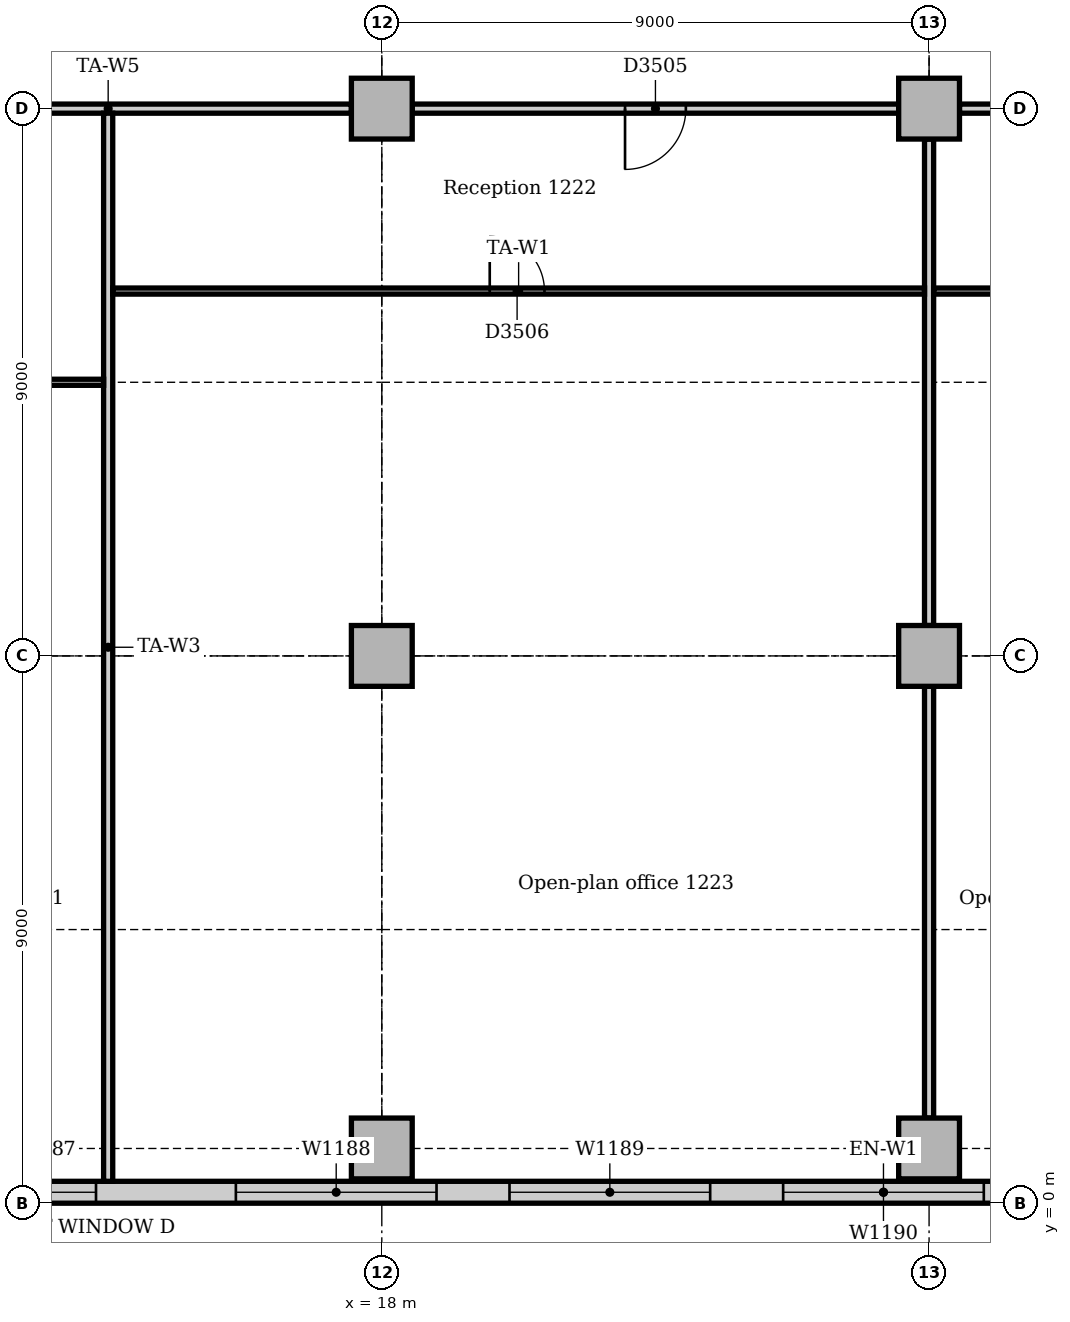
"""IFC4 building model, lengths in metres.
Left out: names, types, materials, properties, quantities, classifications, styles, units other than length and angle.
Written with IfcOpenShell. Run it as: python <this file> out.ifc"""

import sys

from ifc_helpers import new_model, si_unit, direction, frame, frame_2d, origin, origin_2d, place, context, subcontext, project, spatial, rectangle, extrude, element, fill, save


model = new_model("IFC4")
c1 = context("Model", 3, precision=1e-05, world=origin(), true_north=direction((0.0, 1.0)))
c2 = subcontext(c1, "Body", "Model", "MODEL_VIEW")
j1 = project(units=[si_unit("LENGTHUNIT", "METRE"), si_unit("PLANEANGLEUNIT", "RADIAN")], contexts=[c1])
p1 = place(None, origin())
s1 = spatial("IfcSite", under=j1, at=p1, CompositionType="ELEMENT")
p2 = place(p1, origin())
s2 = spatial("IfcBuilding", under=s1, at=p2, CompositionType="ELEMENT")
p3 = place(p2, frame((0.0, 0.0, 55.0)))
s3 = spatial("IfcBuildingStorey", under=s2, at=p3, CompositionType="ELEMENT", Elevation=55.0)
for number, where, z_axis, x_axis in (
    (1, (18.0, 0.9, 0.0), (0.0, 0.0, 1.0), (1.0, 0.0, 0.0)),
    (2, (27.0, 0.9, 0.0), (0.0, 0.0, 1.0), (1.0, 0.0, 0.0)),
    (3, (18.0, 9.0, 0.0), (0.0, 0.0, 1.0), (1.0, 0.0, 0.0)),
    (4, (18.0, 18.0, 0.0), (0.0, 0.0, 1.0), (1.0, 0.0, 0.0)),
    (5, (27.0, 9.0, 0.0), (0.0, 0.0, 1.0), (1.0, 0.0, 0.0)),
    (6, (27.0, 18.0, 0.0), (0.0, 0.0, 1.0), (1.0, 0.0, 0.0)),
):
    element("IfcColumn", number, at=place(p3, frame(where, z_axis=z_axis, x_axis=x_axis)), inside=s3, PredefinedType="COLUMN", context=c2, shape_type="SweptSolid", body=[
        extrude(rectangle(XDim=1.0, YDim=1.0, at=origin_2d()), origin(), (0.0, 0.0, 1.0), 3.85),
    ])
p4 = place(p3, frame((4.243, 0.18, 0.0), z_axis=(0.0, 0.0, 1.0), x_axis=(1.0, 0.0, 0.0)))
e7 = element("IfcWall", 7, at=p4, inside=s3, PredefinedType="STANDARD", context=c2, shape_type="SweptSolid", body=[
    extrude(rectangle(XDim=44.015, YDim=0.36, at=frame_2d((22.007, 0.0))), origin(), (0.0, 0.0, 1.0), 3.85),
])
p5 = place(p4, frame((2.707, 0.0, 0.9)))
e8 = element("IfcOpeningElement", 8, at=p5, cuts=e7, PredefinedType="OPENING", context=c2, shape_type="SweptSolid", body=[
    extrude(rectangle(XDim=3.3, YDim=1.6, at=frame_2d((1.65, 0.8))), frame((0.0, 0.19, 0.0), z_axis=(0.0, -1.0, 0.0), x_axis=(1.0, 0.0, 0.0)), (0.0, 0.0, 1.0), 0.38),
])
p6 = place(p4, frame((7.257, 0.0, 0.9)))
e9 = element("IfcOpeningElement", 9, at=p6, cuts=e7, PredefinedType="OPENING", context=c2, shape_type="SweptSolid", body=[
    extrude(rectangle(XDim=1.8, YDim=1.6, at=frame_2d((0.9, 0.8))), frame((0.0, 0.19, 0.0), z_axis=(0.0, -1.0, 0.0), x_axis=(1.0, 0.0, 0.0)), (0.0, 0.0, 1.0), 0.38),
])
p7 = place(p4, frame((11.357, 0.0, 0.9)))
e10 = element("IfcOpeningElement", 10, at=p7, cuts=e7, PredefinedType="OPENING", context=c2, shape_type="SweptSolid", body=[
    extrude(rectangle(XDim=3.3, YDim=1.6, at=frame_2d((1.65, 0.8))), frame((0.0, 0.19, 0.0), z_axis=(0.0, -1.0, 0.0), x_axis=(1.0, 0.0, 0.0)), (0.0, 0.0, 1.0), 0.38),
])
p8 = place(p4, frame((15.857, 0.0, 0.9)))
e11 = element("IfcOpeningElement", 11, at=p8, cuts=e7, PredefinedType="OPENING", context=c2, shape_type="SweptSolid", body=[
    extrude(rectangle(XDim=3.3, YDim=1.6, at=frame_2d((1.65, 0.8))), frame((0.0, 0.19, 0.0), z_axis=(0.0, -1.0, 0.0), x_axis=(1.0, 0.0, 0.0)), (0.0, 0.0, 1.0), 0.38),
])
p9 = place(p4, frame((20.357, 0.0, 0.9)))
e12 = element("IfcOpeningElement", 12, at=p9, cuts=e7, PredefinedType="OPENING", context=c2, shape_type="SweptSolid", body=[
    extrude(rectangle(XDim=3.3, YDim=1.6, at=frame_2d((1.65, 0.8))), frame((0.0, 0.19, 0.0), z_axis=(0.0, -1.0, 0.0), x_axis=(1.0, 0.0, 0.0)), (0.0, 0.0, 1.0), 0.38),
])
p10 = place(p4, frame((25.307, 0.0, 0.9)))
e13 = element("IfcOpeningElement", 13, at=p10, cuts=e7, PredefinedType="OPENING", context=c2, shape_type="SweptSolid", body=[
    extrude(rectangle(XDim=1.8, YDim=1.6, at=frame_2d((0.9, 0.8))), frame((0.0, 0.19, 0.0), z_axis=(0.0, -1.0, 0.0), x_axis=(1.0, 0.0, 0.0)), (0.0, 0.0, 1.0), 0.38),
])
p11 = place(p4, frame((29.357, 0.0, 0.9)))
e14 = element("IfcOpeningElement", 14, at=p11, cuts=e7, PredefinedType="OPENING", context=c2, shape_type="SweptSolid", body=[
    extrude(rectangle(XDim=3.3, YDim=1.6, at=frame_2d((1.65, 0.8))), frame((0.0, 0.19, 0.0), z_axis=(0.0, -1.0, 0.0), x_axis=(1.0, 0.0, 0.0)), (0.0, 0.0, 1.0), 0.38),
])
p12 = place(p4, frame((33.857, 0.0, 0.9)))
e15 = element("IfcOpeningElement", 15, at=p12, cuts=e7, PredefinedType="OPENING", context=c2, shape_type="SweptSolid", body=[
    extrude(rectangle(XDim=3.3, YDim=1.6, at=frame_2d((1.65, 0.8))), frame((0.0, 0.19, 0.0), z_axis=(0.0, -1.0, 0.0), x_axis=(1.0, 0.0, 0.0)), (0.0, 0.0, 1.0), 0.38),
])
p13 = place(p4, frame((38.657, 0.0, 0.9)))
e16 = element("IfcOpeningElement", 16, at=p13, cuts=e7, PredefinedType="OPENING", context=c2, shape_type="SweptSolid", body=[
    extrude(rectangle(XDim=3.3, YDim=1.6, at=frame_2d((1.65, 0.8))), frame((0.0, 0.19, 0.0), z_axis=(0.0, -1.0, 0.0), x_axis=(1.0, 0.0, 0.0)), (0.0, 0.0, 1.0), 0.38),
])
p14 = place(p3, frame((27.5, 18.0, 0.0), z_axis=(0.0, 0.0, 1.0), x_axis=(1.0, 0.0, 0.0)))
e17 = element("IfcWall", 17, at=p14, inside=s3, PredefinedType="PARTITIONING", context=c2, shape_type="SweptSolid", body=[
    extrude(rectangle(XDim=8.0, YDim=0.15, at=frame_2d((4.0, 0.0))), origin(), (0.0, 0.0, 1.0), 3.15),
])
p15 = place(p14, frame((3.5, 0.0, 0.0)))
e18 = element("IfcOpeningElement", 18, at=p15, cuts=e17, PredefinedType="OPENING", context=c2, shape_type="SweptSolid", body=[
    extrude(rectangle(XDim=1.0, YDim=2.1, at=frame_2d((0.5, 1.05))), frame((0.0, 0.085, 0.0), z_axis=(0.0, -1.0, 0.0), x_axis=(1.0, 0.0, 0.0)), (0.0, 0.0, 1.0), 0.17),
])
p16 = place(p3, frame((18.5, 18.0, 0.0), z_axis=(0.0, 0.0, 1.0), x_axis=(1.0, 0.0, 0.0)))
e19 = element("IfcWall", 19, at=p16, inside=s3, PredefinedType="PARTITIONING", context=c2, shape_type="SweptSolid", body=[
    extrude(rectangle(XDim=8.0, YDim=0.15, at=frame_2d((4.0, 0.0))), origin(), (0.0, 0.0, 1.0), 3.15),
])
p17 = place(p16, frame((3.5, 0.0, 0.0)))
e20 = element("IfcOpeningElement", 20, at=p17, cuts=e19, PredefinedType="OPENING", context=c2, shape_type="SweptSolid", body=[
    extrude(rectangle(XDim=1.0, YDim=2.1, at=frame_2d((0.5, 1.05))), frame((0.0, 0.085, 0.0), z_axis=(0.0, -1.0, 0.0), x_axis=(1.0, 0.0, 0.0)), (0.0, 0.0, 1.0), 0.17),
])
p18 = place(p3, frame((9.5, 18.0, 0.0), z_axis=(0.0, 0.0, 1.0), x_axis=(1.0, 0.0, 0.0)))
e21 = element("IfcWall", 21, at=p18, inside=s3, PredefinedType="PARTITIONING", context=c2, shape_type="SweptSolid", body=[
    extrude(rectangle(XDim=8.0, YDim=0.15, at=frame_2d((4.0, 0.0))), origin(), (0.0, 0.0, 1.0), 3.15),
])
p19 = place(p3, frame((13.5, 0.36, 0.0), z_axis=(0.0, 0.0, 1.0), x_axis=(0.0, 1.0, 0.0)))
e22 = element("IfcWall", 22, at=p19, inside=s3, PredefinedType="PARTITIONING", context=c2, shape_type="SweptSolid", body=[
    extrude(rectangle(XDim=17.565, YDim=0.15, at=frame_2d((8.783, 0.0))), origin(), (0.0, 0.0, 1.0), 3.85),
])
p20 = place(p3, frame((27.0, 1.4, 0.0), z_axis=(0.0, 0.0, 1.0), x_axis=(0.0, 1.0, 0.0)))
e23 = element("IfcWall", 23, at=p20, inside=s3, PredefinedType="PARTITIONING", context=c2, shape_type="SweptSolid", body=[
    extrude(rectangle(XDim=7.1, YDim=0.15, at=frame_2d((3.55, 0.0))), origin(), (0.0, 0.0, 1.0), 3.158),
])
p21 = place(p3, frame((27.0, 9.5, 0.0), z_axis=(0.0, 0.0, 1.0), x_axis=(0.0, 1.0, 0.0)))
e24 = element("IfcWall", 24, at=p21, inside=s3, PredefinedType="PARTITIONING", context=c2, shape_type="SweptSolid", body=[
    extrude(rectangle(XDim=8.0, YDim=0.15, at=frame_2d((4.0, 0.0))), origin(), (0.0, 0.0, 1.0), 3.158),
])
p22 = place(p3, frame((13.575, 15.0, 0.0), z_axis=(0.0, 0.0, 1.0), x_axis=(1.0, 0.0, 0.0)))
e25 = element("IfcWall", 25, at=p22, inside=s3, PredefinedType="PARTITIONING", context=c2, shape_type="SweptSolid", body=[
    extrude(rectangle(XDim=13.35, YDim=0.1, at=frame_2d((6.675, 0.0))), origin(), (0.0, 0.0, 1.0), 3.85),
])
p23 = place(p22, frame((6.2, 0.0, 0.0)))
e26 = element("IfcOpeningElement", 26, at=p23, cuts=e25, PredefinedType="OPENING", context=c2, shape_type="SweptSolid", body=[
    extrude(rectangle(XDim=0.9, YDim=2.1, at=frame_2d((0.45, 1.05))), frame((0.0, 0.06, 0.0), z_axis=(0.0, -1.0, 0.0), x_axis=(1.0, 0.0, 0.0)), (0.0, 0.0, 1.0), 0.12),
])
p24 = place(p3, frame((27.075, 15.0, 0.0), z_axis=(0.0, 0.0, 1.0), x_axis=(1.0, 0.0, 0.0)))
e27 = element("IfcWall", 27, at=p24, inside=s3, PredefinedType="PARTITIONING", context=c2, shape_type="SweptSolid", body=[
    extrude(rectangle(XDim=8.85, YDim=0.1, at=frame_2d((4.425, 0.0))), origin(), (0.0, 0.0, 1.0), 3.85),
])
p25 = place(p24, frame((1.85, 0.0, 0.0)))
e28 = element("IfcOpeningElement", 28, at=p25, cuts=e27, PredefinedType="OPENING", context=c2, shape_type="SweptSolid", body=[
    extrude(rectangle(XDim=0.9, YDim=2.1, at=frame_2d((0.45, 1.05))), frame((0.0, 0.06, 0.0), z_axis=(0.0, -1.0, 0.0), x_axis=(1.0, 0.0, 0.0)), (0.0, 0.0, 1.0), 0.12),
])
p26 = place(p24, frame((6.125, 0.0, 0.0)))
e29 = element("IfcOpeningElement", 29, at=p26, cuts=e27, PredefinedType="OPENING", context=c2, shape_type="SweptSolid", body=[
    extrude(rectangle(XDim=0.9, YDim=2.1, at=frame_2d((0.45, 1.05))), frame((0.0, 0.06, 0.0), z_axis=(0.0, -1.0, 0.0), x_axis=(1.0, 0.0, 0.0)), (0.0, 0.0, 1.0), 0.12),
])
p27 = place(p3, frame((0.36, 13.5, 0.0), z_axis=(0.0, 0.0, 1.0), x_axis=(1.0, 0.0, 0.0)))
e30 = element("IfcWall", 30, at=p27, inside=s3, PredefinedType="PARTITIONING", context=c2, shape_type="SweptSolid", body=[
    extrude(rectangle(XDim=13.065, YDim=0.1, at=frame_2d((6.532, 0.0))), origin(), (0.0, 0.0, 1.0), 3.35),
])
p28 = place(p27, frame((2.8, 0.0, 0.0)))
e31 = element("IfcOpeningElement", 31, at=p28, cuts=e30, PredefinedType="OPENING", context=c2, shape_type="SweptSolid", body=[
    extrude(rectangle(XDim=0.9, YDim=2.1, at=frame_2d((0.45, 1.05))), frame((0.0, 0.06, 0.0), z_axis=(0.0, -1.0, 0.0), x_axis=(1.0, 0.0, 0.0)), (0.0, 0.0, 1.0), 0.12),
])
p29 = place(p27, frame((9.19, 0.0, 0.0)))
e32 = element("IfcOpeningElement", 32, at=p29, cuts=e30, PredefinedType="OPENING", context=c2, shape_type="SweptSolid", body=[
    extrude(rectangle(XDim=0.9, YDim=2.1, at=frame_2d((0.45, 1.05))), frame((0.0, 0.06, 0.0), z_axis=(0.0, -1.0, 0.0), x_axis=(1.0, 0.0, 0.0)), (0.0, 0.0, 1.0), 0.12),
])
p30 = place(p6, origin())
e33 = element("IfcWindow", 33, at=p30, inside=s3, PartitioningType="SINGLE_PANEL", PredefinedType="WINDOW", context=c2, shape_type="SweptSolid", body=[
    extrude(rectangle(XDim=1.8, YDim=1.6, at=frame_2d((0.9, 0.8))), frame((0.0, 0.13, 0.0), z_axis=(0.0, -1.0, 0.0), x_axis=(1.0, 0.0, 0.0)), (0.0, 0.0, 1.0), 0.06),
])
fill(e9, e33)
p31 = place(p7, origin())
e34 = element("IfcWindow", 34, at=p31, inside=s3, PartitioningType="SINGLE_PANEL", PredefinedType="WINDOW", context=c2, shape_type="SweptSolid", body=[
    extrude(rectangle(XDim=3.3, YDim=1.6, at=frame_2d((1.65, 0.8))), frame((0.0, 0.13, 0.0), z_axis=(0.0, -1.0, 0.0), x_axis=(1.0, 0.0, 0.0)), (0.0, 0.0, 1.0), 0.06),
])
fill(e10, e34)
p32 = place(p8, origin())
e35 = element("IfcWindow", 35, at=p32, inside=s3, PartitioningType="SINGLE_PANEL", PredefinedType="WINDOW", context=c2, shape_type="SweptSolid", body=[
    extrude(rectangle(XDim=3.3, YDim=1.6, at=frame_2d((1.65, 0.8))), frame((0.0, 0.13, 0.0), z_axis=(0.0, -1.0, 0.0), x_axis=(1.0, 0.0, 0.0)), (0.0, 0.0, 1.0), 0.06),
])
fill(e11, e35)
p33 = place(p9, origin())
e36 = element("IfcWindow", 36, at=p33, inside=s3, PartitioningType="SINGLE_PANEL", PredefinedType="WINDOW", context=c2, shape_type="SweptSolid", body=[
    extrude(rectangle(XDim=3.3, YDim=1.6, at=frame_2d((1.65, 0.8))), frame((0.0, 0.13, 0.0), z_axis=(0.0, -1.0, 0.0), x_axis=(1.0, 0.0, 0.0)), (0.0, 0.0, 1.0), 0.06),
])
fill(e12, e36)
p34 = place(p17, frame((1.0, 0.0, 0.0), z_axis=(0.0, 0.0, 1.0), x_axis=(-1.0, 0.0, 0.0)))
e37 = element("IfcDoor", 37, at=p34, inside=s3, OperationType="SINGLE_SWING_RIGHT", PredefinedType="DOOR", context=c2, shape_type="SweptSolid", body=[
    extrude(rectangle(XDim=1.0, YDim=2.1, at=frame_2d((0.5, 1.05))), frame((0.0, 0.025, 0.0), z_axis=(0.0, -1.0, 0.0), x_axis=(1.0, 0.0, 0.0)), (0.0, 0.0, 1.0), 0.05),
])
fill(e20, e37)
p35 = place(p23, origin())
e38 = element("IfcDoor", 38, at=p35, inside=s3, OperationType="SINGLE_SWING_LEFT", PredefinedType="DOOR", context=c2, shape_type="SweptSolid", body=[
    extrude(rectangle(XDim=0.9, YDim=2.1, at=frame_2d((0.45, 1.05))), frame((0.0, 0.025, 0.0), z_axis=(0.0, -1.0, 0.0), x_axis=(1.0, 0.0, 0.0)), (0.0, 0.0, 1.0), 0.05),
])
fill(e26, e38)
save(model, sys.argv[1])
